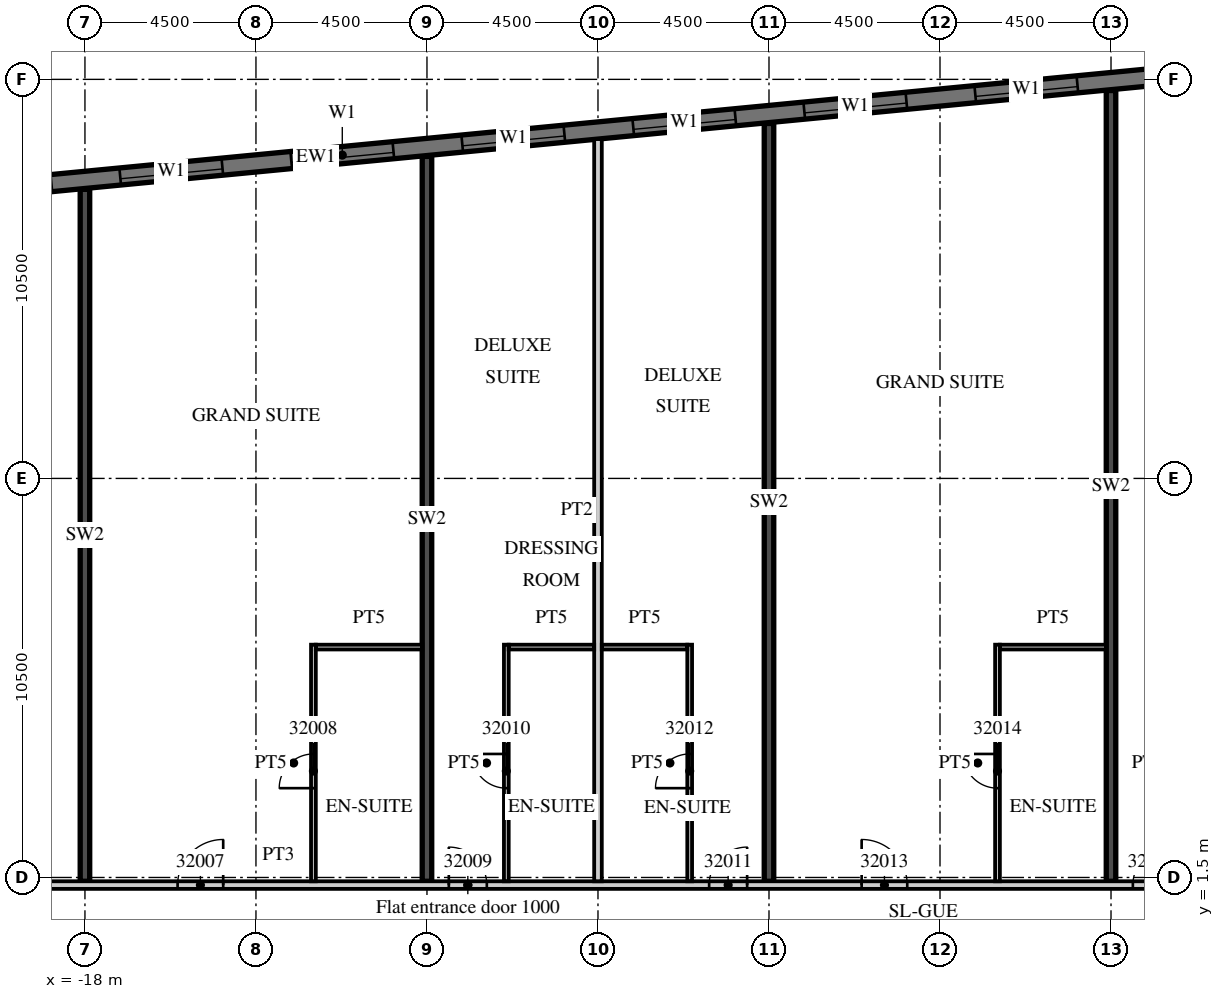
"""IFC4 building model, lengths in metres.
Left out: names, types, materials, properties, quantities, classifications, styles, units other than length and angle.
Written with IfcOpenShell. Run it as: python <this file> out.ifc"""

import sys

from ifc_helpers import new_model, si_unit, direction, frame, frame_2d, origin, place, context, subcontext, project, spatial, rectangle, extrude, element, fill, save


model = new_model("IFC4")
c1 = context("Model", 3, precision=1e-05, world=origin(), true_north=direction((0.0, 1.0)))
c2 = subcontext(c1, "Body", "Model", "MODEL_VIEW")
j1 = project(units=[si_unit("LENGTHUNIT", "METRE"), si_unit("PLANEANGLEUNIT", "RADIAN")], contexts=[c1])
p1 = place(None, origin())
s1 = spatial("IfcSite", under=j1, at=p1, CompositionType="ELEMENT")
p2 = place(p1, origin())
s2 = spatial("IfcBuilding", under=s1, at=p2, CompositionType="ELEMENT")
p3 = place(p2, frame((0.0, 0.0, 140.5)))
s3 = spatial("IfcBuildingStorey", under=s2, at=p3, CompositionType="ELEMENT", Elevation=140.5)
p4 = place(p3, frame((-18.0, 1.4, 0.0), z_axis=(0.0, 0.0, 1.0), x_axis=(0.0, 1.0, 0.0)))
e1 = element("IfcWall", 1, at=p4, inside=s3, PredefinedType="SHEAR", context=c2, shape_type="SweptSolid", body=[
    extrude(rectangle(XDim=18.207, YDim=0.25, at=frame_2d((9.104, 0.0))), origin(), (0.0, 0.0, 1.0), 3.3),
])
p5 = place(p3, frame((-9.0, 1.4, 0.0), z_axis=(0.0, 0.0, 1.0), x_axis=(0.0, 1.0, 0.0)))
e2 = element("IfcWall", 2, at=p5, inside=s3, PredefinedType="SHEAR", context=c2, shape_type="SweptSolid", body=[
    extrude(rectangle(XDim=19.073, YDim=0.25, at=frame_2d((9.537, 0.0))), origin(), (0.0, 0.0, 1.0), 3.3),
])
p6 = place(p3, frame((0.0, 1.4, 0.0), z_axis=(0.0, 0.0, 1.0), x_axis=(0.0, 1.0, 0.0)))
e3 = element("IfcWall", 3, at=p6, inside=s3, PredefinedType="SHEAR", context=c2, shape_type="SweptSolid", body=[
    extrude(rectangle(XDim=19.94, YDim=0.25, at=frame_2d((9.97, 0.0))), origin(), (0.0, 0.0, 1.0), 3.3),
])
p7 = place(p3, frame((9.0, 1.4, 0.0), z_axis=(0.0, 0.0, 1.0), x_axis=(0.0, 1.0, 0.0)))
e4 = element("IfcWall", 4, at=p7, inside=s3, PredefinedType="SHEAR", context=c2, shape_type="SweptSolid", body=[
    extrude(rectangle(XDim=20.807, YDim=0.25, at=frame_2d((10.403, 0.0))), origin(), (0.0, 0.0, 1.0), 3.3),
])
p8 = place(p3, frame((13.521, 22.89, 0.0), z_axis=(0.0, 0.0, 1.0), x_axis=(-0.995396445054, -0.095843190545, 0.0)))
e5 = element("IfcWall", 5, at=p8, inside=s3, PredefinedType="SOLIDWALL", context=c2, shape_type="SweptSolid", body=[
    extrude(rectangle(XDim=51.114, YDim=0.45, at=frame_2d((25.557, 0.0))), origin(), (0.0, 0.0, 1.0), 3.02),
])
p9 = place(p8, frame((0.91, 0.0, 0.45)))
e6 = element("IfcOpeningElement", 6, at=p9, cuts=e5, PredefinedType="OPENING", context=c2, shape_type="SweptSolid", body=[
    extrude(rectangle(XDim=2.7, YDim=2.25, at=frame_2d((1.35, 1.125))), frame((0.0, 0.235, 0.0), z_axis=(0.0, -1.0, 0.0), x_axis=(1.0, 0.0, 0.0)), (0.0, 0.0, 1.0), 0.47),
])
p10 = place(p8, frame((5.431, 0.0, 0.45)))
e7 = element("IfcOpeningElement", 7, at=p10, cuts=e5, PredefinedType="OPENING", context=c2, shape_type="SweptSolid", body=[
    extrude(rectangle(XDim=2.7, YDim=2.25, at=frame_2d((1.35, 1.125))), frame((0.0, 0.235, 0.0), z_axis=(0.0, -1.0, 0.0), x_axis=(1.0, 0.0, 0.0)), (0.0, 0.0, 1.0), 0.47),
])
p11 = place(p8, frame((9.952, 0.0, 0.45)))
e8 = element("IfcOpeningElement", 8, at=p11, cuts=e5, PredefinedType="OPENING", context=c2, shape_type="SweptSolid", body=[
    extrude(rectangle(XDim=2.7, YDim=2.25, at=frame_2d((1.35, 1.125))), frame((0.0, 0.235, 0.0), z_axis=(0.0, -1.0, 0.0), x_axis=(1.0, 0.0, 0.0)), (0.0, 0.0, 1.0), 0.47),
])
p12 = place(p8, frame((14.473, 0.0, 0.45)))
e9 = element("IfcOpeningElement", 9, at=p12, cuts=e5, PredefinedType="OPENING", context=c2, shape_type="SweptSolid", body=[
    extrude(rectangle(XDim=2.7, YDim=2.25, at=frame_2d((1.35, 1.125))), frame((0.0, 0.235, 0.0), z_axis=(0.0, -1.0, 0.0), x_axis=(1.0, 0.0, 0.0)), (0.0, 0.0, 1.0), 0.47),
])
p13 = place(p8, frame((18.994, 0.0, 0.45)))
e10 = element("IfcOpeningElement", 10, at=p13, cuts=e5, PredefinedType="OPENING", context=c2, shape_type="SweptSolid", body=[
    extrude(rectangle(XDim=2.7, YDim=2.25, at=frame_2d((1.35, 1.125))), frame((0.0, 0.235, 0.0), z_axis=(0.0, -1.0, 0.0), x_axis=(1.0, 0.0, 0.0)), (0.0, 0.0, 1.0), 0.47),
])
p14 = place(p8, frame((23.514, 0.0, 0.45)))
e11 = element("IfcOpeningElement", 11, at=p14, cuts=e5, PredefinedType="OPENING", context=c2, shape_type="SweptSolid", body=[
    extrude(rectangle(XDim=2.7, YDim=2.25, at=frame_2d((1.35, 1.125))), frame((0.0, 0.235, 0.0), z_axis=(0.0, -1.0, 0.0), x_axis=(1.0, 0.0, 0.0)), (0.0, 0.0, 1.0), 0.47),
])
p15 = place(p8, frame((28.035, 0.0, 0.45)))
e12 = element("IfcOpeningElement", 12, at=p15, cuts=e5, PredefinedType="OPENING", context=c2, shape_type="SweptSolid", body=[
    extrude(rectangle(XDim=2.7, YDim=2.25, at=frame_2d((1.35, 1.125))), frame((0.0, 0.235, 0.0), z_axis=(0.0, -1.0, 0.0), x_axis=(1.0, 0.0, 0.0)), (0.0, 0.0, 1.0), 0.47),
])
p16 = place(p8, frame((32.556, 0.0, 0.45)))
e13 = element("IfcOpeningElement", 13, at=p16, cuts=e5, PredefinedType="OPENING", context=c2, shape_type="SweptSolid", body=[
    extrude(rectangle(XDim=2.7, YDim=2.25, at=frame_2d((1.35, 1.125))), frame((0.0, 0.235, 0.0), z_axis=(0.0, -1.0, 0.0), x_axis=(1.0, 0.0, 0.0)), (0.0, 0.0, 1.0), 0.47),
])
p17 = place(p8, frame((37.077, 0.0, 0.45)))
e14 = element("IfcOpeningElement", 14, at=p17, cuts=e5, PredefinedType="OPENING", context=c2, shape_type="SweptSolid", body=[
    extrude(rectangle(XDim=2.7, YDim=2.25, at=frame_2d((1.35, 1.125))), frame((0.0, 0.235, 0.0), z_axis=(0.0, -1.0, 0.0), x_axis=(1.0, 0.0, 0.0)), (0.0, 0.0, 1.0), 0.47),
])
p18 = place(p8, frame((41.598, 0.0, 0.45)))
e15 = element("IfcOpeningElement", 15, at=p18, cuts=e5, PredefinedType="OPENING", context=c2, shape_type="SweptSolid", body=[
    extrude(rectangle(XDim=2.7, YDim=2.25, at=frame_2d((1.35, 1.125))), frame((0.0, 0.235, 0.0), z_axis=(0.0, -1.0, 0.0), x_axis=(1.0, 0.0, 0.0)), (0.0, 0.0, 1.0), 0.47),
])
p19 = place(p8, frame((46.118, 0.0, 0.45)))
e16 = element("IfcOpeningElement", 16, at=p19, cuts=e5, PredefinedType="OPENING", context=c2, shape_type="SweptSolid", body=[
    extrude(rectangle(XDim=2.7, YDim=2.25, at=frame_2d((1.35, 1.125))), frame((0.0, 0.235, 0.0), z_axis=(0.0, -1.0, 0.0), x_axis=(1.0, 0.0, 0.0)), (0.0, 0.0, 1.0), 0.47),
])
p20 = place(p3, frame((-39.316, 1.3, 0.0), z_axis=(0.0, 0.0, 1.0), x_axis=(1.0, 0.0, 0.0)))
e17 = element("IfcWall", 17, at=p20, inside=s3, PredefinedType="PARTITIONING", context=c2, shape_type="SweptSolid", body=[
    extrude(rectangle(XDim=52.816, YDim=0.2, at=frame_2d((26.408, 0.0))), origin(), (0.0, 0.0, 1.0), 3.02),
])
p21 = place(p20, frame((0.15, 0.0, 0.0)))
e18 = element("IfcOpeningElement", 18, at=p21, cuts=e17, PredefinedType="OPENING", context=c2, shape_type="SweptSolid", body=[
    extrude(rectangle(XDim=0.9, YDim=2.1, at=frame_2d((0.45, 1.05))), frame((0.0, 0.11, 0.0), z_axis=(0.0, -1.0, 0.0), x_axis=(1.0, 0.0, 0.0)), (0.0, 0.0, 1.0), 0.22),
])
p22 = place(p20, frame((8.679, 0.0, 0.0)))
e19 = element("IfcOpeningElement", 19, at=p22, cuts=e17, PredefinedType="OPENING", context=c2, shape_type="SweptSolid", body=[
    extrude(rectangle(XDim=1.2, YDim=2.1, at=frame_2d((0.6, 1.05))), frame((0.0, 0.11, 0.0), z_axis=(0.0, -1.0, 0.0), x_axis=(1.0, 0.0, 0.0)), (0.0, 0.0, 1.0), 0.22),
])
p23 = place(p20, frame((17.678, 0.0, 0.0)))
e20 = element("IfcOpeningElement", 20, at=p23, cuts=e17, PredefinedType="OPENING", context=c2, shape_type="SweptSolid", body=[
    extrude(rectangle(XDim=1.2, YDim=2.1, at=frame_2d((0.6, 1.05))), frame((0.0, 0.11, 0.0), z_axis=(0.0, -1.0, 0.0), x_axis=(1.0, 0.0, 0.0)), (0.0, 0.0, 1.0), 0.22),
])
p24 = place(p20, frame((23.754, 0.0, 0.0)))
e21 = element("IfcOpeningElement", 21, at=p24, cuts=e17, PredefinedType="OPENING", context=c2, shape_type="SweptSolid", body=[
    extrude(rectangle(XDim=1.2, YDim=2.1, at=frame_2d((0.6, 1.05))), frame((0.0, 0.11, 0.0), z_axis=(0.0, -1.0, 0.0), x_axis=(1.0, 0.0, 0.0)), (0.0, 0.0, 1.0), 0.22),
])
p25 = place(p20, frame((30.891, 0.0, 0.0)))
e22 = element("IfcOpeningElement", 22, at=p25, cuts=e17, PredefinedType="OPENING", context=c2, shape_type="SweptSolid", body=[
    extrude(rectangle(XDim=1.0, YDim=2.1, at=frame_2d((0.5, 1.05))), frame((0.0, 0.11, 0.0), z_axis=(0.0, -1.0, 0.0), x_axis=(1.0, 0.0, 0.0)), (0.0, 0.0, 1.0), 0.22),
])
p26 = place(p20, frame((37.741, 0.0, 0.0)))
e23 = element("IfcOpeningElement", 23, at=p26, cuts=e17, PredefinedType="OPENING", context=c2, shape_type="SweptSolid", body=[
    extrude(rectangle(XDim=1.0, YDim=2.1, at=frame_2d((0.5, 1.05))), frame((0.0, 0.11, 0.0), z_axis=(0.0, -1.0, 0.0), x_axis=(1.0, 0.0, 0.0)), (0.0, 0.0, 1.0), 0.22),
])
p27 = place(p20, frame((41.754, 0.0, 0.0)))
e24 = element("IfcOpeningElement", 24, at=p27, cuts=e17, PredefinedType="OPENING", context=c2, shape_type="SweptSolid", body=[
    extrude(rectangle(XDim=1.2, YDim=2.1, at=frame_2d((0.6, 1.05))), frame((0.0, 0.11, 0.0), z_axis=(0.0, -1.0, 0.0), x_axis=(1.0, 0.0, 0.0)), (0.0, 0.0, 1.0), 0.22),
])
p28 = place(p20, frame((48.891, 0.0, 0.0)))
e25 = element("IfcOpeningElement", 25, at=p28, cuts=e17, PredefinedType="OPENING", context=c2, shape_type="SweptSolid", body=[
    extrude(rectangle(XDim=1.0, YDim=2.1, at=frame_2d((0.5, 1.05))), frame((0.0, 0.11, 0.0), z_axis=(0.0, -1.0, 0.0), x_axis=(1.0, 0.0, 0.0)), (0.0, 0.0, 1.0), 0.22),
])
p29 = place(p3, frame((-11.988, 1.4, 0.0), z_axis=(0.0, 0.0, 1.0), x_axis=(0.0, 1.0, 0.0)))
e26 = element("IfcWall", 26, at=p29, inside=s3, PredefinedType="PARTITIONING", context=c2, shape_type="SweptSolid", body=[
    extrude(rectangle(XDim=6.225, YDim=0.125, at=frame_2d((3.113, 0.0))), origin(), (0.0, 0.0, 1.0), 3.02),
])
p30 = place(p29, frame((2.45, 0.0, 0.0)))
e27 = element("IfcOpeningElement", 27, at=p30, cuts=e26, PredefinedType="OPENING", context=c2, shape_type="SweptSolid", body=[
    extrude(rectangle(XDim=0.9, YDim=2.1, at=frame_2d((0.45, 1.05))), frame((0.0, 0.073, 0.0), z_axis=(0.0, -1.0, 0.0), x_axis=(1.0, 0.0, 0.0)), (0.0, 0.0, 1.0), 0.145),
])
p31 = place(p3, frame((-11.925, 7.562, 0.0), z_axis=(0.0, 0.0, 1.0), x_axis=(1.0, 0.0, 0.0)))
e28 = element("IfcWall", 28, at=p31, inside=s3, PredefinedType="PARTITIONING", context=c2, shape_type="SweptSolid", body=[
    extrude(rectangle(XDim=2.8, YDim=0.125, at=frame_2d((1.4, 0.0))), origin(), (0.0, 0.0, 1.0), 3.02),
])
p32 = place(p3, frame((-4.5, 1.4, 0.0), z_axis=(0.0, 0.0, 1.0), x_axis=(0.0, 1.0, 0.0)))
e29 = element("IfcWall", 29, at=p32, inside=s3, PredefinedType="PARTITIONING", context=c2, shape_type="SweptSolid", body=[
    extrude(rectangle(XDim=19.529, YDim=0.2, at=frame_2d((9.765, 0.0))), origin(), (0.0, 0.0, 1.0), 3.02),
])
p33 = place(p3, frame((-6.912, 1.4, 0.0), z_axis=(0.0, 0.0, 1.0), x_axis=(0.0, 1.0, 0.0)))
e30 = element("IfcWall", 30, at=p33, inside=s3, PredefinedType="PARTITIONING", context=c2, shape_type="SweptSolid", body=[
    extrude(rectangle(XDim=6.225, YDim=0.125, at=frame_2d((3.113, 0.0))), origin(), (0.0, 0.0, 1.0), 3.02),
])
p34 = place(p33, frame((2.45, 0.0, 0.0)))
e31 = element("IfcOpeningElement", 31, at=p34, cuts=e30, PredefinedType="OPENING", context=c2, shape_type="SweptSolid", body=[
    extrude(rectangle(XDim=0.9, YDim=2.1, at=frame_2d((0.45, 1.05))), frame((0.0, 0.073, 0.0), z_axis=(0.0, -1.0, 0.0), x_axis=(1.0, 0.0, 0.0)), (0.0, 0.0, 1.0), 0.145),
])
p35 = place(p3, frame((-6.85, 7.562, 0.0), z_axis=(0.0, 0.0, 1.0), x_axis=(1.0, 0.0, 0.0)))
e32 = element("IfcWall", 32, at=p35, inside=s3, PredefinedType="PARTITIONING", context=c2, shape_type="SweptSolid", body=[
    extrude(rectangle(XDim=2.25, YDim=0.125, at=frame_2d((1.125, 0.0))), origin(), (0.0, 0.0, 1.0), 3.02),
])
p36 = place(p3, frame((-2.087, 1.4, 0.0), z_axis=(0.0, 0.0, 1.0), x_axis=(0.0, 1.0, 0.0)))
e33 = element("IfcWall", 33, at=p36, inside=s3, PredefinedType="PARTITIONING", context=c2, shape_type="SweptSolid", body=[
    extrude(rectangle(XDim=6.225, YDim=0.125, at=frame_2d((3.113, 0.0))), origin(), (0.0, 0.0, 1.0), 3.02),
])
p37 = place(p36, frame((2.45, 0.0, 0.0)))
e34 = element("IfcOpeningElement", 34, at=p37, cuts=e33, PredefinedType="OPENING", context=c2, shape_type="SweptSolid", body=[
    extrude(rectangle(XDim=0.9, YDim=2.1, at=frame_2d((0.45, 1.05))), frame((0.0, 0.073, 0.0), z_axis=(0.0, -1.0, 0.0), x_axis=(1.0, 0.0, 0.0)), (0.0, 0.0, 1.0), 0.145),
])
p38 = place(p3, frame((-4.4, 7.562, 0.0), z_axis=(0.0, 0.0, 1.0), x_axis=(1.0, 0.0, 0.0)))
e35 = element("IfcWall", 35, at=p38, inside=s3, PredefinedType="PARTITIONING", context=c2, shape_type="SweptSolid", body=[
    extrude(rectangle(XDim=2.25, YDim=0.125, at=frame_2d((1.125, 0.0))), origin(), (0.0, 0.0, 1.0), 3.02),
])
p39 = place(p3, frame((6.013, 1.4, 0.0), z_axis=(0.0, 0.0, 1.0), x_axis=(0.0, 1.0, 0.0)))
e36 = element("IfcWall", 36, at=p39, inside=s3, PredefinedType="PARTITIONING", context=c2, shape_type="SweptSolid", body=[
    extrude(rectangle(XDim=6.225, YDim=0.125, at=frame_2d((3.113, 0.0))), origin(), (0.0, 0.0, 1.0), 3.02),
])
p40 = place(p39, frame((2.45, 0.0, 0.0)))
e37 = element("IfcOpeningElement", 37, at=p40, cuts=e36, PredefinedType="OPENING", context=c2, shape_type="SweptSolid", body=[
    extrude(rectangle(XDim=0.9, YDim=2.1, at=frame_2d((0.45, 1.05))), frame((0.0, 0.073, 0.0), z_axis=(0.0, -1.0, 0.0), x_axis=(1.0, 0.0, 0.0)), (0.0, 0.0, 1.0), 0.145),
])
p41 = place(p3, frame((6.075, 7.562, 0.0), z_axis=(0.0, 0.0, 1.0), x_axis=(1.0, 0.0, 0.0)))
e38 = element("IfcWall", 38, at=p41, inside=s3, PredefinedType="PARTITIONING", context=c2, shape_type="SweptSolid", body=[
    extrude(rectangle(XDim=2.8, YDim=0.125, at=frame_2d((1.4, 0.0))), origin(), (0.0, 0.0, 1.0), 3.02),
])
p42 = place(p10, origin())
e39 = element("IfcWindow", 39, at=p42, inside=s3, PartitioningType="SINGLE_PANEL", PredefinedType="WINDOW", context=c2, shape_type="SweptSolid", body=[
    extrude(rectangle(XDim=2.7, YDim=2.25, at=frame_2d((1.35, 1.125))), frame((0.0, 0.09, 0.0), z_axis=(0.0, -1.0, 0.0), x_axis=(1.0, 0.0, 0.0)), (0.0, 0.0, 1.0), 0.06),
])
fill(e7, e39)
p43 = place(p11, origin())
e40 = element("IfcWindow", 40, at=p43, inside=s3, PartitioningType="SINGLE_PANEL", PredefinedType="WINDOW", context=c2, shape_type="SweptSolid", body=[
    extrude(rectangle(XDim=2.7, YDim=2.25, at=frame_2d((1.35, 1.125))), frame((0.0, 0.09, 0.0), z_axis=(0.0, -1.0, 0.0), x_axis=(1.0, 0.0, 0.0)), (0.0, 0.0, 1.0), 0.06),
])
fill(e8, e40)
p44 = place(p12, origin())
e41 = element("IfcWindow", 41, at=p44, inside=s3, PartitioningType="SINGLE_PANEL", PredefinedType="WINDOW", context=c2, shape_type="SweptSolid", body=[
    extrude(rectangle(XDim=2.7, YDim=2.25, at=frame_2d((1.35, 1.125))), frame((0.0, 0.09, 0.0), z_axis=(0.0, -1.0, 0.0), x_axis=(1.0, 0.0, 0.0)), (0.0, 0.0, 1.0), 0.06),
])
fill(e9, e41)
p45 = place(p13, origin())
e42 = element("IfcWindow", 42, at=p45, inside=s3, PartitioningType="SINGLE_PANEL", PredefinedType="WINDOW", context=c2, shape_type="SweptSolid", body=[
    extrude(rectangle(XDim=2.7, YDim=2.25, at=frame_2d((1.35, 1.125))), frame((0.0, 0.09, 0.0), z_axis=(0.0, -1.0, 0.0), x_axis=(1.0, 0.0, 0.0)), (0.0, 0.0, 1.0), 0.06),
])
fill(e10, e42)
p46 = place(p14, origin())
e43 = element("IfcWindow", 43, at=p46, inside=s3, PartitioningType="SINGLE_PANEL", PredefinedType="WINDOW", context=c2, shape_type="SweptSolid", body=[
    extrude(rectangle(XDim=2.7, YDim=2.25, at=frame_2d((1.35, 1.125))), frame((0.0, 0.09, 0.0), z_axis=(0.0, -1.0, 0.0), x_axis=(1.0, 0.0, 0.0)), (0.0, 0.0, 1.0), 0.06),
])
fill(e11, e43)
p47 = place(p15, origin())
e44 = element("IfcWindow", 44, at=p47, inside=s3, PartitioningType="SINGLE_PANEL", PredefinedType="WINDOW", context=c2, shape_type="SweptSolid", body=[
    extrude(rectangle(XDim=2.7, YDim=2.25, at=frame_2d((1.35, 1.125))), frame((0.0, 0.09, 0.0), z_axis=(0.0, -1.0, 0.0), x_axis=(1.0, 0.0, 0.0)), (0.0, 0.0, 1.0), 0.06),
])
fill(e12, e44)
p48 = place(p24, origin())
e45 = element("IfcDoor", 45, at=p48, inside=s3, OperationType="SINGLE_SWING_RIGHT", PredefinedType="DOOR", context=c2, shape_type="SweptSolid", body=[
    extrude(rectangle(XDim=1.2, YDim=2.1, at=frame_2d((0.6, 1.05))), frame((0.0, 0.025, 0.0), z_axis=(0.0, -1.0, 0.0), x_axis=(1.0, 0.0, 0.0)), (0.0, 0.0, 1.0), 0.05),
])
fill(e21, e45)
p49 = place(p30, origin())
e46 = element("IfcDoor", 46, at=p49, inside=s3, OperationType="SINGLE_SWING_LEFT", PredefinedType="DOOR", context=c2, shape_type="SweptSolid", body=[
    extrude(rectangle(XDim=0.9, YDim=2.1, at=frame_2d((0.45, 1.05))), frame((0.0, 0.025, 0.0), z_axis=(0.0, -1.0, 0.0), x_axis=(1.0, 0.0, 0.0)), (0.0, 0.0, 1.0), 0.05),
])
fill(e27, e46)
p50 = place(p25, origin())
e47 = element("IfcDoor", 47, at=p50, inside=s3, OperationType="SINGLE_SWING_LEFT", PredefinedType="DOOR", context=c2, shape_type="SweptSolid", body=[
    extrude(rectangle(XDim=1.0, YDim=2.1, at=frame_2d((0.5, 1.05))), frame((0.0, 0.025, 0.0), z_axis=(0.0, -1.0, 0.0), x_axis=(1.0, 0.0, 0.0)), (0.0, 0.0, 1.0), 0.05),
])
fill(e22, e47)
p51 = place(p34, origin())
e48 = element("IfcDoor", 48, at=p51, inside=s3, OperationType="SINGLE_SWING_RIGHT", PredefinedType="DOOR", context=c2, shape_type="SweptSolid", body=[
    extrude(rectangle(XDim=0.9, YDim=2.1, at=frame_2d((0.45, 1.05))), frame((0.0, 0.025, 0.0), z_axis=(0.0, -1.0, 0.0), x_axis=(1.0, 0.0, 0.0)), (0.0, 0.0, 1.0), 0.05),
])
fill(e31, e48)
p52 = place(p26, origin())
e49 = element("IfcDoor", 49, at=p52, inside=s3, OperationType="SINGLE_SWING_RIGHT", PredefinedType="DOOR", context=c2, shape_type="SweptSolid", body=[
    extrude(rectangle(XDim=1.0, YDim=2.1, at=frame_2d((0.5, 1.05))), frame((0.0, 0.025, 0.0), z_axis=(0.0, -1.0, 0.0), x_axis=(1.0, 0.0, 0.0)), (0.0, 0.0, 1.0), 0.05),
])
fill(e23, e49)
p53 = place(p37, origin())
e50 = element("IfcDoor", 50, at=p53, inside=s3, OperationType="SINGLE_SWING_LEFT", PredefinedType="DOOR", context=c2, shape_type="SweptSolid", body=[
    extrude(rectangle(XDim=0.9, YDim=2.1, at=frame_2d((0.45, 1.05))), frame((0.0, 0.025, 0.0), z_axis=(0.0, -1.0, 0.0), x_axis=(1.0, 0.0, 0.0)), (0.0, 0.0, 1.0), 0.05),
])
fill(e34, e50)
p54 = place(p27, origin())
e51 = element("IfcDoor", 51, at=p54, inside=s3, OperationType="SINGLE_SWING_LEFT", PredefinedType="DOOR", context=c2, shape_type="SweptSolid", body=[
    extrude(rectangle(XDim=1.2, YDim=2.1, at=frame_2d((0.6, 1.05))), frame((0.0, 0.025, 0.0), z_axis=(0.0, -1.0, 0.0), x_axis=(1.0, 0.0, 0.0)), (0.0, 0.0, 1.0), 0.05),
])
fill(e24, e51)
p55 = place(p40, origin())
e52 = element("IfcDoor", 52, at=p55, inside=s3, OperationType="SINGLE_SWING_RIGHT", PredefinedType="DOOR", context=c2, shape_type="SweptSolid", body=[
    extrude(rectangle(XDim=0.9, YDim=2.1, at=frame_2d((0.45, 1.05))), frame((0.0, 0.025, 0.0), z_axis=(0.0, -1.0, 0.0), x_axis=(1.0, 0.0, 0.0)), (0.0, 0.0, 1.0), 0.05),
])
fill(e37, e52)
p56 = place(p28, origin())
e53 = element("IfcDoor", 53, at=p56, inside=s3, OperationType="SINGLE_SWING_RIGHT", PredefinedType="DOOR", context=c2, shape_type="SweptSolid", body=[
    extrude(rectangle(XDim=1.0, YDim=2.1, at=frame_2d((0.5, 1.05))), frame((0.0, 0.025, 0.0), z_axis=(0.0, -1.0, 0.0), x_axis=(1.0, 0.0, 0.0)), (0.0, 0.0, 1.0), 0.05),
])
fill(e25, e53)
save(model, sys.argv[1])
